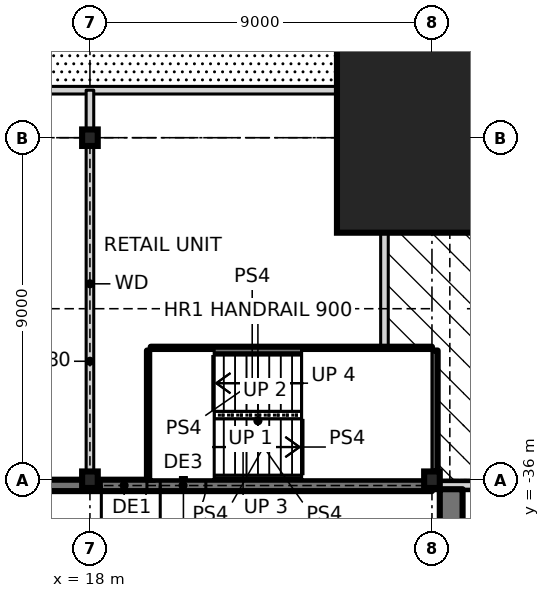
"""IFC4 building model, lengths in metres.
Left out: names, types, materials, properties, quantities, classifications, styles, units other than length and angle.
Written with IfcOpenShell. Run it as: python <this file> out.ifc"""

import sys

from ifc_helpers import new_model, si_unit, direction, frame, frame_2d, origin, origin_2d, place, context, subcontext, project, spatial, rectangle, i_section, extrude, element, fill, save


model = new_model("IFC4")
c1 = context("Model", 3, precision=1e-05, world=origin(), true_north=direction((0.0, 1.0)))
c2 = subcontext(c1, "Body", "Model", "MODEL_VIEW")
j1 = project(units=[si_unit("LENGTHUNIT", "METRE"), si_unit("PLANEANGLEUNIT", "RADIAN")], contexts=[c1])
p1 = place(None, origin())
s1 = spatial("IfcSite", under=j1, at=p1, CompositionType="ELEMENT")
p2 = place(p1, origin())
s2 = spatial("IfcBuilding", under=s1, at=p2, CompositionType="ELEMENT")
p3 = place(p2, origin())
s3 = spatial("IfcBuildingStorey", under=s2, at=p3, CompositionType="ELEMENT", Elevation=0.0)
p4 = place(p3, frame((27.0, -27.0, 0.0), z_axis=(0.0, 0.0, 1.0), x_axis=(1.0, 0.0, 0.0)))
e1 = element("IfcColumn", 1, at=p4, inside=s3, PredefinedType="COLUMN", context=c2, shape_type="SweptSolid", body=[
    extrude(rectangle(XDim=5.0, YDim=5.0, at=origin_2d()), origin(), (0.0, 0.0, 1.0), 6.0),
    extrude(i_section(OverallWidth=0.478, OverallDepth=0.599, WebThickness=0.1, FlangeThickness=0.14, at=origin_2d()), origin(), (0.0, 0.0, 1.0), 6.0),
])
for number, where, z_axis, x_axis in (
    (2, (18.0, -36.0, 0.0), (0.0, 0.0, 1.0), (1.0, 0.0, 0.0)),
    (3, (18.0, -27.0, 0.0), (0.0, 0.0, 1.0), (1.0, 0.0, 0.0)),
    (4, (27.0, -36.0, 0.0), (0.0, 0.0, 1.0), (1.0, 0.0, 0.0)),
):
    element("IfcColumn", number, at=place(p3, frame(where, z_axis=z_axis, x_axis=x_axis)), inside=s3, PredefinedType="COLUMN", context=c2, shape_type="SweptSolid", body=[
        extrude(i_section(OverallWidth=0.411, OverallDepth=0.434, WebThickness=0.036, FlangeThickness=0.057, at=origin_2d()), origin(), (0.0, 0.0, 1.0), 6.0),
    ])
p5 = place(p3, frame((9.0, -36.15, -0.25), z_axis=(0.0, 0.0, 1.0), x_axis=(1.0, 0.0, 0.0)))
e5 = element("IfcWall", 5, at=p5, inside=s3, PredefinedType="SOLIDWALL", context=c2, shape_type="SweptSolid", body=[
    extrude(rectangle(XDim=9.0, YDim=0.3, at=frame_2d((4.5, 0.0))), origin(), (0.0, 0.0, 1.0), 6.25),
])
p6 = place(p5, frame((1.0, 0.0, 0.25)))
e6 = element("IfcOpeningElement", 6, at=p6, cuts=e5, PredefinedType="OPENING", context=c2, shape_type="SweptSolid", body=[
    extrude(rectangle(XDim=1.2, YDim=2.4, at=frame_2d((0.6, 1.2))), frame((0.0, 0.16, 0.0), z_axis=(0.0, -1.0, 0.0), x_axis=(1.0, 0.0, 0.0)), (0.0, 0.0, 1.0), 0.32),
])
p7 = place(p5, frame((3.4, 0.0, 0.85)))
e7 = element("IfcOpeningElement", 7, at=p7, cuts=e5, PredefinedType="OPENING", context=c2, shape_type="SweptSolid", body=[
    extrude(rectangle(XDim=4.2, YDim=3.6, at=frame_2d((2.1, 1.8))), frame((0.0, 0.16, 0.0), z_axis=(0.0, -1.0, 0.0), x_axis=(1.0, 0.0, 0.0)), (0.0, 0.0, 1.0), 0.32),
])
p8 = place(p3, frame((18.0, -36.15, -0.25), z_axis=(0.0, 0.0, 1.0), x_axis=(1.0, 0.0, 0.0)))
e8 = element("IfcWall", 8, at=p8, inside=s3, PredefinedType="SOLIDWALL", context=c2, shape_type="SweptSolid", body=[
    extrude(rectangle(XDim=9.0, YDim=0.3, at=frame_2d((4.5, 0.0))), origin(), (0.0, 0.0, 1.0), 6.25),
])
p9 = place(p8, frame((0.3, 0.0, 0.25)))
e9 = element("IfcOpeningElement", 9, at=p9, cuts=e8, PredefinedType="OPENING", context=c2, shape_type="SweptSolid", body=[
    extrude(rectangle(XDim=1.2, YDim=2.4, at=frame_2d((0.6, 1.2))), frame((0.0, 0.16, 0.0), z_axis=(0.0, -1.0, 0.0), x_axis=(1.0, 0.0, 0.0)), (0.0, 0.0, 1.0), 0.32),
])
p10 = place(p8, frame((1.85, 0.0, 0.25)))
e10 = element("IfcOpeningElement", 10, at=p10, cuts=e8, PredefinedType="OPENING", context=c2, shape_type="SweptSolid", body=[
    extrude(rectangle(XDim=1.2, YDim=2.4, at=frame_2d((0.6, 1.2))), frame((0.0, 0.16, 0.0), z_axis=(0.0, -1.0, 0.0), x_axis=(1.0, 0.0, 0.0)), (0.0, 0.0, 1.0), 0.32),
])
p11 = place(p3, frame((27.0, -36.15, -0.25), z_axis=(0.0, 0.0, 1.0), x_axis=(1.0, 0.0, 0.0)))
e11 = element("IfcWall", 11, at=p11, inside=s3, PredefinedType="SOLIDWALL", context=c2, shape_type="SweptSolid", body=[
    extrude(rectangle(XDim=9.0, YDim=0.2, at=frame_2d((4.5, 0.0))), origin(), (0.0, 0.0, 1.0), 6.25),
])
p12 = place(p11, frame((3.3, 0.0, 0.25)))
e12 = element("IfcOpeningElement", 12, at=p12, cuts=e11, PredefinedType="OPENING", context=c2, shape_type="SweptSolid", body=[
    extrude(rectangle(XDim=2.4, YDim=3.0, at=frame_2d((1.2, 1.5))), frame((0.0, 0.11, 0.0), z_axis=(0.0, -1.0, 0.0), x_axis=(1.0, 0.0, 0.0)), (0.0, 0.0, 1.0), 0.22),
])
p13 = place(p3, frame((27.506, -36.25, -0.15), z_axis=(0.0, 0.0, 1.0), x_axis=(0.0, -1.0, 0.0)))
e13 = element("IfcWall", 13, at=p13, inside=s3, PredefinedType="SOLIDWALL", context=c2, shape_type="SweptSolid", body=[
    extrude(rectangle(XDim=3.05, YDim=0.6, at=frame_2d((1.525, 0.0))), origin(), (0.0, 0.0, 1.0), 9.15),
])
p14 = place(p3, frame((19.6, -32.6, 0.0), z_axis=(0.0, 0.0, 1.0), x_axis=(1.0, 0.0, 0.0)))
e14 = element("IfcWall", 14, at=p14, inside=s3, PredefinedType="SOLIDWALL", context=c2, shape_type="SweptSolid", body=[
    extrude(rectangle(XDim=7.4, YDim=0.2, at=frame_2d((3.7, 0.0))), origin(), (0.0, 0.0, 1.0), 6.0),
])
p15 = place(p3, frame((-25.75, -25.75, 0.0), z_axis=(0.0, 0.0, 1.0), x_axis=(1.0, 0.0, 0.0)))
e15 = element("IfcWall", 15, at=p15, inside=s3, PredefinedType="SOLIDWALL", context=c2, shape_type="SweptSolid", body=[
    extrude(rectangle(XDim=51.5, YDim=0.2, at=frame_2d((25.75, 0.0))), origin(), (0.0, 0.0, 1.0), 3.0),
])
p16 = place(p3, frame((27.0, -35.783, 0.0), z_axis=(0.0, 0.0, 1.0), x_axis=(0.0, 1.0, 0.0)))
e16 = element("IfcWall", 16, at=p16, inside=s3, PredefinedType="SOLIDWALL", context=c2, shape_type="SweptSolid", body=[
    extrude(rectangle(XDim=3.183, YDim=0.3, at=frame_2d((1.591, 0.0))), origin(), (0.0, 0.0, 1.0), 6.0),
])
p17 = place(p3, frame((25.75, -32.6, 0.0), z_axis=(0.0, 0.0, 1.0), x_axis=(0.0, 1.0, 0.0)))
e17 = element("IfcWall", 17, at=p17, inside=s3, PredefinedType="SOLIDWALL", context=c2, shape_type="SweptSolid", body=[
    extrude(rectangle(XDim=65.2, YDim=0.2, at=frame_2d((32.6, 0.0))), origin(), (0.0, 0.0, 1.0), 5.75),
])
p18 = place(p17, frame((31.2, 0.0, 0.0)))
e18 = element("IfcOpeningElement", 18, at=p18, cuts=e17, PredefinedType="OPENING", context=c2, shape_type="SweptSolid", body=[
    extrude(rectangle(XDim=1.8, YDim=2.4, at=frame_2d((0.9, 1.2))), frame((0.0, 0.11, 0.0), z_axis=(0.0, -1.0, 0.0), x_axis=(1.0, 0.0, 0.0)), (0.0, 0.0, 1.0), 0.22),
])
p19 = place(p3, frame((19.6, -36.0, 0.0), z_axis=(0.0, 0.0, 1.0), x_axis=(0.0, 1.0, 0.0)))
e19 = element("IfcWall", 19, at=p19, inside=s3, PredefinedType="SOLIDWALL", context=c2, shape_type="SweptSolid", body=[
    extrude(rectangle(XDim=3.4, YDim=0.2, at=frame_2d((1.7, 0.0))), origin(), (0.0, 0.0, 1.0), 6.0),
])
p20 = place(p3, frame((18.0, -35.94, 0.0), z_axis=(0.0, 0.0, 1.0), x_axis=(0.0, 1.0, 0.0)))
e20 = element("IfcWall", 20, at=p20, inside=s3, PredefinedType="SOLIDWALL", context=c2, shape_type="SweptSolid", body=[
    extrude(rectangle(XDim=10.19, YDim=0.2, at=frame_2d((5.095, 0.0))), origin(), (0.0, 0.0, 1.0), 4.98),
])
p21 = place(p9, frame((1.2, 0.0, 0.0), z_axis=(0.0, 0.0, 1.0), x_axis=(-1.0, 0.0, 0.0)))
e21 = element("IfcDoor", 21, at=p21, inside=s3, OperationType="SINGLE_SWING_RIGHT", PredefinedType="DOOR", context=c2, shape_type="SweptSolid", body=[
    extrude(rectangle(XDim=1.2, YDim=2.4, at=frame_2d((0.6, 1.2))), frame((0.0, 0.025, 0.0), z_axis=(0.0, -1.0, 0.0), x_axis=(1.0, 0.0, 0.0)), (0.0, 0.0, 1.0), 0.05),
])
fill(e9, e21)
p22 = place(p10, frame((1.2, 0.0, 0.0), z_axis=(0.0, 0.0, 1.0), x_axis=(-1.0, 0.0, 0.0)))
e22 = element("IfcDoor", 22, at=p22, inside=s3, OperationType="SINGLE_SWING_RIGHT", PredefinedType="DOOR", context=c2, shape_type="SweptSolid", body=[
    extrude(rectangle(XDim=1.2, YDim=2.4, at=frame_2d((0.6, 1.2))), frame((0.0, 0.025, 0.0), z_axis=(0.0, -1.0, 0.0), x_axis=(1.0, 0.0, 0.0)), (0.0, 0.0, 1.0), 0.05),
])
fill(e10, e22)
save(model, sys.argv[1])
